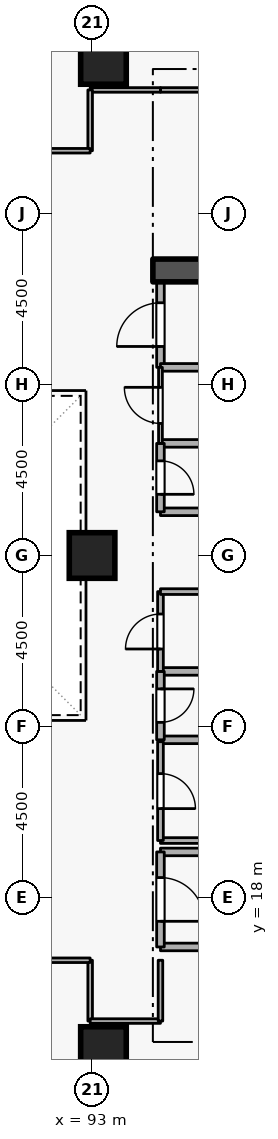
"""IFC4 building model, lengths in metres.
Left out: names, types, materials, properties, quantities, classifications, styles, units other than length and angle.
Written with IfcOpenShell. Run it as: python <this file> out.ifc"""

import sys

from ifc_helpers import new_model, si_unit, direction, frame, frame_2d, origin, origin_2d, place, context, subcontext, project, spatial, rectangle, extrude, element, fill, save


model = new_model("IFC4")
c1 = context("Model", 3, precision=1e-05, world=origin(), true_north=direction((0.0, 1.0)))
c2 = subcontext(c1, "Body", "Model", "MODEL_VIEW")
j1 = project(units=[si_unit("LENGTHUNIT", "METRE"), si_unit("PLANEANGLEUNIT", "RADIAN")], contexts=[c1])
p1 = place(None, origin())
s1 = spatial("IfcSite", under=j1, at=p1, CompositionType="ELEMENT")
p2 = place(p1, origin())
s2 = spatial("IfcBuilding", under=s1, at=p2, CompositionType="ELEMENT")
p3 = place(p2, frame((0.0, 0.0, 75.9)))
s3 = spatial("IfcBuildingStorey", under=s2, at=p3, CompositionType="ELEMENT", Elevation=75.9)
p4 = place(p3, frame((94.6, 34.5, 0.0), z_axis=(0.0, 0.0, 1.0), x_axis=(1.0, 0.0, 0.0)))
e1 = element("IfcWall", 1, at=p4, inside=s3, PredefinedType="SHEAR", context=c2, shape_type="SweptSolid", body=[
    extrude(rectangle(XDim=5.7, YDim=0.6, at=frame_2d((2.85, 0.0))), origin(), (0.0, 0.0, 1.0), 4.2),
])
for number, where, z_axis, x_axis in (
    (2, (93.3, 14.0, 0.0), (0.0, 0.0, 1.0), (1.0, 0.0, 0.0)),
    (3, (93.3, 40.0, 0.0), (0.0, 0.0, 1.0), (1.0, 0.0, 0.0)),
    (4, (93.0, 27.0, 0.0), (0.0, 0.0, 1.0), (1.0, 0.0, 0.0)),
):
    element("IfcColumn", number, at=place(p3, frame(where, z_axis=z_axis, x_axis=x_axis)), inside=s3, PredefinedType="COLUMN", context=c2, shape_type="SweptSolid", body=[
        extrude(rectangle(XDim=1.2, YDim=1.2, at=origin_2d()), origin(), (0.0, 0.0, 1.0), 4.2),
    ])
p5 = place(p3, frame((94.8, 16.7, 0.0), z_axis=(0.0, 0.0, 1.0), x_axis=(1.0, 0.0, 0.0)))
e5 = element("IfcWall", 5, at=p5, inside=s3, PredefinedType="STANDARD", context=c2, shape_type="SweptSolid", body=[
    extrude(rectangle(XDim=5.7, YDim=0.2, at=frame_2d((2.85, 0.0))), origin(), (0.0, 0.0, 1.0), 3.94),
])
p6 = place(p3, frame((97.1, 19.2, 0.0), z_axis=(0.0, 0.0, 1.0), x_axis=(-1.0, 0.0, 0.0)))
e6 = element("IfcWall", 6, at=p6, inside=s3, PredefinedType="STANDARD", context=c2, shape_type="SweptSolid", body=[
    extrude(rectangle(XDim=2.3, YDim=0.2, at=frame_2d((1.15, 0.0))), origin(), (0.0, 0.0, 1.0), 3.145),
])
p7 = place(p3, frame((94.8, 19.2, 0.0), z_axis=(0.0, 0.0, 1.0), x_axis=(0.0, -1.0, 0.0)))
e7 = element("IfcWall", 7, at=p7, inside=s3, PredefinedType="STANDARD", context=c2, shape_type="SweptSolid", body=[
    extrude(rectangle(XDim=2.5, YDim=0.2, at=frame_2d((1.25, 0.0))), origin(), (0.0, 0.0, 1.0), 3.94),
])
p8 = place(p7, frame((0.675, 0.0, 0.0)))
e8 = element("IfcOpeningElement", 8, at=p8, cuts=e7, PredefinedType="OPENING", context=c2, shape_type="SweptSolid", body=[
    extrude(rectangle(XDim=1.15, YDim=2.1, at=frame_2d((0.575, 1.05))), frame((0.0, 0.11, 0.0), z_axis=(0.0, -1.0, 0.0), x_axis=(1.0, 0.0, 0.0)), (0.0, 0.0, 1.0), 0.22),
])
for number, where, z_axis, x_axis in (
    (9, (94.8, 28.15, 0.0), (0.0, 0.0, 1.0), (1.0, 0.0, 0.0)),
    (10, (96.85, 29.95, 0.0), (0.0, 0.0, 1.0), (-1.0, 0.0, 0.0)),
):
    element("IfcWall", number, at=place(p3, frame(where, z_axis=z_axis, x_axis=x_axis)), inside=s3, PredefinedType="STANDARD", context=c2, shape_type="SweptSolid", body=[
        extrude(rectangle(XDim=2.05, YDim=0.2, at=frame_2d((1.025, 0.0))), origin(), (0.0, 0.0, 1.0), 3.94),
    ])
p9 = place(p3, frame((94.8, 29.95, 0.0), z_axis=(0.0, 0.0, 1.0), x_axis=(0.0, -1.0, 0.0)))
e11 = element("IfcWall", 11, at=p9, inside=s3, PredefinedType="STANDARD", context=c2, shape_type="SweptSolid", body=[
    extrude(rectangle(XDim=1.8, YDim=0.2, at=frame_2d((0.9, 0.0))), origin(), (0.0, 0.0, 1.0), 3.94),
])
p10 = place(p9, frame((0.46, 0.0, 0.0)))
e12 = element("IfcOpeningElement", 12, at=p10, cuts=e11, PredefinedType="OPENING", context=c2, shape_type="SweptSolid", body=[
    extrude(rectangle(XDim=0.88, YDim=2.04, at=frame_2d((0.44, 1.02))), frame((0.0, 0.11, 0.0), z_axis=(0.0, -1.0, 0.0), x_axis=(1.0, 0.0, 0.0)), (0.0, 0.0, 1.0), 0.22),
])
for number, where, z_axis, x_axis in (
    (13, (94.8, 22.15, 0.0), (0.0, 0.0, 1.0), (1.0, 0.0, 0.0)),
    (14, (96.85, 23.95, 0.0), (0.0, 0.0, 1.0), (-1.0, 0.0, 0.0)),
):
    element("IfcWall", number, at=place(p3, frame(where, z_axis=z_axis, x_axis=x_axis)), inside=s3, PredefinedType="STANDARD", context=c2, shape_type="SweptSolid", body=[
        extrude(rectangle(XDim=2.05, YDim=0.2, at=frame_2d((1.025, 0.0))), origin(), (0.0, 0.0, 1.0), 3.94),
    ])
p11 = place(p3, frame((94.8, 23.95, 0.0), z_axis=(0.0, 0.0, 1.0), x_axis=(0.0, -1.0, 0.0)))
e15 = element("IfcWall", 15, at=p11, inside=s3, PredefinedType="STANDARD", context=c2, shape_type="SweptSolid", body=[
    extrude(rectangle(XDim=1.8, YDim=0.2, at=frame_2d((0.9, 0.0))), origin(), (0.0, 0.0, 1.0), 3.94),
])
p12 = place(p11, frame((0.46, 0.0, 0.0)))
e16 = element("IfcOpeningElement", 16, at=p12, cuts=e15, PredefinedType="OPENING", context=c2, shape_type="SweptSolid", body=[
    extrude(rectangle(XDim=0.88, YDim=2.04, at=frame_2d((0.44, 1.02))), frame((0.0, 0.11, 0.0), z_axis=(0.0, -1.0, 0.0), x_axis=(1.0, 0.0, 0.0)), (0.0, 0.0, 1.0), 0.22),
])
p13 = place(p3, frame((94.8, 31.95, 0.0), z_axis=(0.0, 0.0, 1.0), x_axis=(0.0, 1.0, 0.0)))
e17 = element("IfcWall", 17, at=p13, inside=s3, PredefinedType="STANDARD", context=c2, shape_type="SweptSolid", body=[
    extrude(rectangle(XDim=2.25, YDim=0.2, at=frame_2d((1.125, 0.0))), origin(), (0.0, 0.0, 1.0), 3.94),
])
p14 = place(p13, frame((0.55, 0.0, 0.0)))
e18 = element("IfcOpeningElement", 18, at=p14, cuts=e17, PredefinedType="OPENING", context=c2, shape_type="SweptSolid", body=[
    extrude(rectangle(XDim=1.15, YDim=2.1, at=frame_2d((0.575, 1.05))), frame((0.0, 0.11, 0.0), z_axis=(0.0, -1.0, 0.0), x_axis=(1.0, 0.0, 0.0)), (0.0, 0.0, 1.0), 0.22),
])
p15 = place(p3, frame((96.85, 31.95, 0.0), z_axis=(0.0, 0.0, 1.0), x_axis=(-1.0, 0.0, 0.0)))
e19 = element("IfcWall", 19, at=p15, inside=s3, PredefinedType="STANDARD", context=c2, shape_type="SweptSolid", body=[
    extrude(rectangle(XDim=2.05, YDim=0.2, at=frame_2d((1.025, 0.0))), origin(), (0.0, 0.0, 1.0), 3.94),
])
p16 = place(p3, frame((94.8, 19.5, 0.0), z_axis=(0.0, 0.0, 1.0), x_axis=(1.0, 0.0, 0.0)))
e20 = element("IfcWall", 20, at=p16, inside=s3, PredefinedType="PARTITIONING", context=c2, shape_type="SweptSolid", body=[
    extrude(rectangle(XDim=2.05, YDim=0.15, at=frame_2d((1.025, 0.0))), origin(), (0.0, 0.0, 1.0), 3.145),
])
p17 = place(p3, frame((94.8, 22.1, 0.0), z_axis=(0.0, 0.0, 1.0), x_axis=(0.0, -1.0, 0.0)))
e21 = element("IfcWall", 21, at=p17, inside=s3, PredefinedType="PARTITIONING", context=c2, shape_type="SweptSolid", body=[
    extrude(rectangle(XDim=2.6, YDim=0.15, at=frame_2d((1.3, 0.0))), origin(), (0.0, 0.0, 1.0), 3.94),
])
p18 = place(p17, frame((0.84, 0.0, 0.0)))
e22 = element("IfcOpeningElement", 22, at=p18, cuts=e21, PredefinedType="OPENING", context=c2, shape_type="SweptSolid", body=[
    extrude(rectangle(XDim=0.92, YDim=2.08, at=frame_2d((0.46, 1.04))), frame((0.0, 0.085, 0.0), z_axis=(0.0, -1.0, 0.0), x_axis=(1.0, 0.0, 0.0)), (0.0, 0.0, 1.0), 0.17),
])
p19 = place(p3, frame((94.8, 23.95, 0.0), z_axis=(0.0, 0.0, 1.0), x_axis=(0.0, 1.0, 0.0)))
e23 = element("IfcWall", 23, at=p19, inside=s3, PredefinedType="PARTITIONING", context=c2, shape_type="SweptSolid", body=[
    extrude(rectangle(XDim=2.1, YDim=0.15, at=frame_2d((1.05, 0.0))), origin(), (0.0, 0.0, 1.0), 3.94),
])
p20 = place(p19, frame((0.59, 0.0, 0.0)))
e24 = element("IfcOpeningElement", 24, at=p20, cuts=e23, PredefinedType="OPENING", context=c2, shape_type="SweptSolid", body=[
    extrude(rectangle(XDim=0.92, YDim=2.08, at=frame_2d((0.46, 1.04))), frame((0.0, 0.085, 0.0), z_axis=(0.0, -1.0, 0.0), x_axis=(1.0, 0.0, 0.0)), (0.0, 0.0, 1.0), 0.17),
])
p21 = place(p3, frame((94.8, 26.05, 0.0), z_axis=(0.0, 0.0, 1.0), x_axis=(1.0, 0.0, 0.0)))
e25 = element("IfcWall", 25, at=p21, inside=s3, PredefinedType="PARTITIONING", context=c2, shape_type="SweptSolid", body=[
    extrude(rectangle(XDim=2.05, YDim=0.15, at=frame_2d((1.025, 0.0))), origin(), (0.0, 0.0, 1.0), 3.94),
])
p22 = place(p3, frame((94.8, 29.95, 0.0), z_axis=(0.0, 0.0, 1.0), x_axis=(0.0, 1.0, 0.0)))
e26 = element("IfcWall", 26, at=p22, inside=s3, PredefinedType="PARTITIONING", context=c2, shape_type="SweptSolid", body=[
    extrude(rectangle(XDim=2.0, YDim=0.1, at=frame_2d((1.0, 0.0))), origin(), (0.0, 0.0, 1.0), 3.94),
])
p23 = place(p22, frame((0.525, 0.0, 0.0)))
e27 = element("IfcOpeningElement", 27, at=p23, cuts=e26, PredefinedType="OPENING", context=c2, shape_type="SweptSolid", body=[
    extrude(rectangle(XDim=0.95, YDim=2.1, at=frame_2d((0.475, 1.05))), frame((0.0, 0.06, 0.0), z_axis=(0.0, -1.0, 0.0), x_axis=(1.0, 0.0, 0.0)), (0.0, 0.0, 1.0), 0.12),
])
p24 = place(p3, frame((92.95, 16.35, 0.0), z_axis=(0.0, 0.0, 1.0), x_axis=(0.0, -1.0, 0.0)))
e28 = element("IfcWall", 28, at=p24, inside=s3, PredefinedType="PARTITIONING", context=c2, shape_type="SweptSolid", body=[
    extrude(rectangle(XDim=1.6, YDim=0.12, at=frame_2d((0.8, 0.0))), origin(), (0.0, 0.0, 1.0), 3.94),
])
p25 = place(p3, frame((92.95, 14.75, 0.0), z_axis=(0.0, 0.0, 1.0), x_axis=(1.0, 0.0, 0.0)))
e29 = element("IfcWall", 29, at=p25, inside=s3, PredefinedType="PARTITIONING", context=c2, shape_type="SweptSolid", body=[
    extrude(rectangle(XDim=1.85, YDim=0.12, at=frame_2d((0.925, 0.0))), origin(), (0.0, 0.0, 1.0), 3.94),
])
p26 = place(p3, frame((94.8, 14.75, 0.0), z_axis=(0.0, 0.0, 1.0), x_axis=(0.0, 1.0, 0.0)))
e30 = element("IfcWall", 30, at=p26, inside=s3, PredefinedType="PARTITIONING", context=c2, shape_type="SweptSolid", body=[
    extrude(rectangle(XDim=1.6, YDim=0.12, at=frame_2d((0.8, 0.0))), origin(), (0.0, 0.0, 1.0), 3.94),
])
p27 = place(p3, frame((88.5, 16.35, 0.0), z_axis=(0.0, 0.0, 1.0), x_axis=(1.0, 0.0, 0.0)))
e31 = element("IfcWall", 31, at=p27, inside=s3, PredefinedType="PARTITIONING", context=c2, shape_type="SweptSolid", body=[
    extrude(rectangle(XDim=4.45, YDim=0.12, at=frame_2d((2.225, 0.0))), origin(), (0.0, 0.0, 1.0), 3.94),
])
p28 = place(p27, frame((1.7, 0.0, 0.0)))
e32 = element("IfcOpeningElement", 32, at=p28, cuts=e31, PredefinedType="OPENING", context=c2, shape_type="SweptSolid", body=[
    extrude(rectangle(XDim=1.05, YDim=2.1, at=frame_2d((0.525, 1.05))), frame((0.0, 0.07, 0.0), z_axis=(0.0, -1.0, 0.0), x_axis=(1.0, 0.0, 0.0)), (0.0, 0.0, 1.0), 0.14),
])
p29 = place(p3, frame((97.95, 39.25, 0.0), z_axis=(0.0, 0.0, 1.0), x_axis=(-1.0, 0.0, 0.0)))
e33 = element("IfcWall", 33, at=p29, inside=s3, PredefinedType="PARTITIONING", context=c2, shape_type="SweptSolid", body=[
    extrude(rectangle(XDim=3.15, YDim=0.12, at=frame_2d((1.575, 0.0))), origin(), (0.0, 0.0, 1.0), 3.94),
])
p30 = place(p3, frame((94.8, 39.25, 0.0), z_axis=(0.0, 0.0, 1.0), x_axis=(-1.0, 0.0, 0.0)))
e34 = element("IfcWall", 34, at=p30, inside=s3, PredefinedType="PARTITIONING", context=c2, shape_type="SweptSolid", body=[
    extrude(rectangle(XDim=1.85, YDim=0.12, at=frame_2d((0.925, 0.0))), origin(), (0.0, 0.0, 1.0), 3.94),
])
p31 = place(p3, frame((92.95, 39.25, 0.0), z_axis=(0.0, 0.0, 1.0), x_axis=(0.0, -1.0, 0.0)))
e35 = element("IfcWall", 35, at=p31, inside=s3, PredefinedType="PARTITIONING", context=c2, shape_type="SweptSolid", body=[
    extrude(rectangle(XDim=1.6, YDim=0.12, at=frame_2d((0.8, 0.0))), origin(), (0.0, 0.0, 1.0), 3.94),
])
p32 = place(p3, frame((92.95, 37.65, 0.0), z_axis=(0.0, 0.0, 1.0), x_axis=(-1.0, 0.0, 0.0)))
e36 = element("IfcWall", 36, at=p32, inside=s3, PredefinedType="PARTITIONING", context=c2, shape_type="SweptSolid", body=[
    extrude(rectangle(XDim=4.45, YDim=0.12, at=frame_2d((2.225, 0.0))), origin(), (0.0, 0.0, 1.0), 3.94),
])
p33 = place(p32, frame((1.7, 0.0, 0.0)))
e37 = element("IfcOpeningElement", 37, at=p33, cuts=e36, PredefinedType="OPENING", context=c2, shape_type="SweptSolid", body=[
    extrude(rectangle(XDim=1.05, YDim=2.1, at=frame_2d((0.525, 1.05))), frame((0.0, 0.07, 0.0), z_axis=(0.0, -1.0, 0.0), x_axis=(1.0, 0.0, 0.0)), (0.0, 0.0, 1.0), 0.14),
])
p34 = place(p8, origin())
e38 = element("IfcDoor", 38, at=p34, inside=s3, OperationType="SINGLE_SWING_RIGHT", PredefinedType="DOOR", context=c2, shape_type="SweptSolid", body=[
    extrude(rectangle(XDim=1.15, YDim=2.1, at=frame_2d((0.575, 1.05))), frame((0.0, 0.025, 0.0), z_axis=(0.0, -1.0, 0.0), x_axis=(1.0, 0.0, 0.0)), (0.0, 0.0, 1.0), 0.05),
])
fill(e8, e38)
p35 = place(p10, origin())
e39 = element("IfcDoor", 39, at=p35, inside=s3, OperationType="SINGLE_SWING_RIGHT", PredefinedType="DOOR", context=c2, shape_type="SweptSolid", body=[
    extrude(rectangle(XDim=0.88, YDim=2.04, at=frame_2d((0.44, 1.02))), frame((0.0, 0.025, 0.0), z_axis=(0.0, -1.0, 0.0), x_axis=(1.0, 0.0, 0.0)), (0.0, 0.0, 1.0), 0.05),
])
fill(e12, e39)
p36 = place(p12, origin())
e40 = element("IfcDoor", 40, at=p36, inside=s3, OperationType="SINGLE_SWING_LEFT", PredefinedType="DOOR", context=c2, shape_type="SweptSolid", body=[
    extrude(rectangle(XDim=0.88, YDim=2.04, at=frame_2d((0.44, 1.02))), frame((0.0, 0.025, 0.0), z_axis=(0.0, -1.0, 0.0), x_axis=(1.0, 0.0, 0.0)), (0.0, 0.0, 1.0), 0.05),
])
fill(e16, e40)
p37 = place(p18, origin())
e41 = element("IfcDoor", 41, at=p37, inside=s3, OperationType="SINGLE_SWING_RIGHT", PredefinedType="DOOR", context=c2, shape_type="SweptSolid", body=[
    extrude(rectangle(XDim=0.92, YDim=2.08, at=frame_2d((0.46, 1.04))), frame((0.0, 0.025, 0.0), z_axis=(0.0, -1.0, 0.0), x_axis=(1.0, 0.0, 0.0)), (0.0, 0.0, 1.0), 0.05),
])
fill(e22, e41)
p38 = place(p20, origin())
e42 = element("IfcDoor", 42, at=p38, inside=s3, OperationType="SINGLE_SWING_LEFT", PredefinedType="DOOR", context=c2, shape_type="SweptSolid", body=[
    extrude(rectangle(XDim=0.92, YDim=2.08, at=frame_2d((0.46, 1.04))), frame((0.0, 0.025, 0.0), z_axis=(0.0, -1.0, 0.0), x_axis=(1.0, 0.0, 0.0)), (0.0, 0.0, 1.0), 0.05),
])
fill(e24, e42)
p39 = place(p23, origin())
e43 = element("IfcDoor", 43, at=p39, inside=s3, OperationType="SINGLE_SWING_RIGHT", PredefinedType="DOOR", context=c2, shape_type="SweptSolid", body=[
    extrude(rectangle(XDim=0.95, YDim=2.1, at=frame_2d((0.475, 1.05))), frame((0.0, 0.025, 0.0), z_axis=(0.0, -1.0, 0.0), x_axis=(1.0, 0.0, 0.0)), (0.0, 0.0, 1.0), 0.05),
])
fill(e27, e43)
p40 = place(p14, origin())
e44 = element("IfcDoor", 44, at=p40, inside=s3, OperationType="SINGLE_SWING_LEFT", PredefinedType="DOOR", context=c2, shape_type="SweptSolid", body=[
    extrude(rectangle(XDim=1.15, YDim=2.1, at=frame_2d((0.575, 1.05))), frame((0.0, 0.025, 0.0), z_axis=(0.0, -1.0, 0.0), x_axis=(1.0, 0.0, 0.0)), (0.0, 0.0, 1.0), 0.05),
])
fill(e18, e44)
save(model, sys.argv[1])
